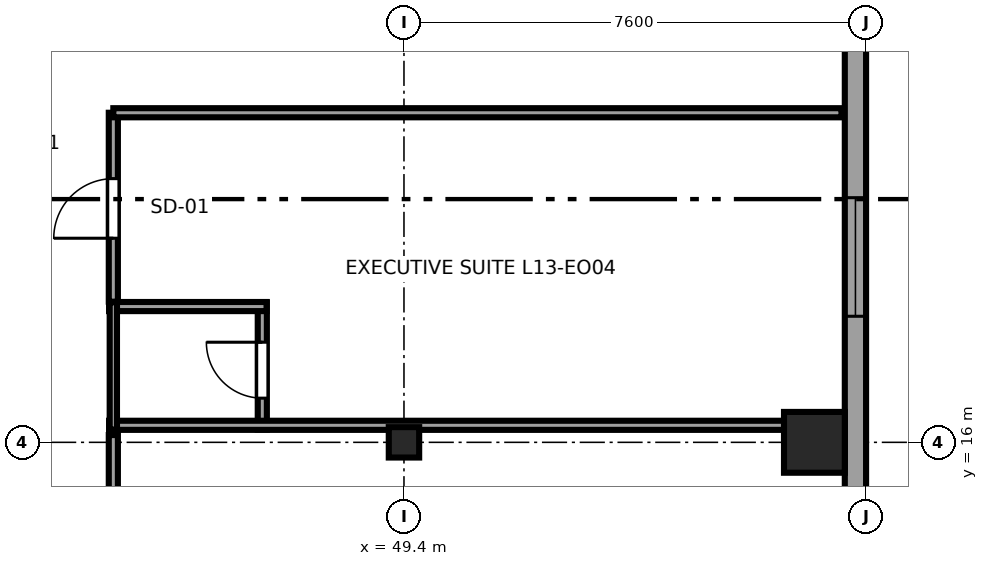
"""IFC4 building model, lengths in metres.
Left out: names, types, materials, properties, quantities, classifications, styles, units other than length and angle.
Written with IfcOpenShell. Run it as: python <this file> out.ifc"""

import sys

from ifc_helpers import new_model, si_unit, direction, frame, frame_2d, origin, origin_2d, place, context, subcontext, project, spatial, rectangle, i_section, extrude, source, transform, mapped, element, fill, save


model = new_model("IFC4")
c1 = context("Model", 3, precision=1e-05, world=origin(), true_north=direction((0.0, 1.0)))
c2 = subcontext(c1, "Body", "Model", "MODEL_VIEW")
j1 = project(units=[si_unit("LENGTHUNIT", "METRE"), si_unit("PLANEANGLEUNIT", "RADIAN")], contexts=[c1])
p1 = place(None, origin())
s1 = spatial("IfcSite", under=j1, at=p1, CompositionType="ELEMENT")
p2 = place(p1, origin())
s2 = spatial("IfcBuilding", under=s1, at=p2, CompositionType="ELEMENT")
p3 = place(p2, frame((0.0, 0.0, 56.85)))
s3 = spatial("IfcBuildingStorey", under=s2, at=p3, CompositionType="ELEMENT", Elevation=56.85)
m1 = source(origin(), c2, "Body", "SweptSolid", [
    extrude(i_section(OverallWidth=0.5, OverallDepth=0.5, WebThickness=0.028, FlangeThickness=0.045, at=origin_2d()), origin(), (0.0, 0.0, 1.0), 3.55),
])
p4 = place(p3, frame((49.4, 16.0, 0.0), z_axis=(0.0, 0.0, 1.0), x_axis=(1.0, 0.0, 0.0)))
e1 = element("IfcColumn", 1, at=p4, inside=s3, PredefinedType="COLUMN", context=c2, shape_type="MappedRepresentation", body=[
    mapped(m1, transform((0.0, 0.0, 0.0), x_axis=(1.0, 0.0, 0.0), y_axis=(0.0, 1.0, 0.0), z_axis=(0.0, 0.0, 1.0), scale=1.0)),
])
m2 = source(origin(), c2, "Body", "SweptSolid", [
    extrude(rectangle(XDim=1.0, YDim=1.0, at=origin_2d()), origin(), (0.0, 0.0, 1.0), 3.55),
])
p5 = place(p3, frame((56.15, 16.0, 0.0), z_axis=(0.0, 0.0, 1.0), x_axis=(1.0, 0.0, 0.0)))
e2 = element("IfcColumn", 2, at=p5, inside=s3, PredefinedType="COLUMN", context=c2, shape_type="MappedRepresentation", body=[
    mapped(m2, transform((0.0, 0.0, 0.0), x_axis=(1.0, 0.0, 0.0), y_axis=(0.0, 1.0, 0.0), z_axis=(0.0, 0.0, 1.0), scale=1.0)),
])
p6 = place(p3, frame((56.825, 4.617, 0.0), z_axis=(0.0, 0.0, 1.0), x_axis=(0.0, 1.0, 0.0)))
e3 = element("IfcWall", 3, at=p6, inside=s3, PredefinedType="SOLIDWALL", context=c2, shape_type="SweptSolid", body=[
    extrude(rectangle(XDim=36.766, YDim=0.35, at=frame_2d((18.383, 0.0))), origin(), (0.0, 0.0, 1.0), 3.37),
])
p7 = place(p6, frame((8.454, 0.0, 0.68)))
e4 = element("IfcOpeningElement", 4, at=p7, cuts=e3, PredefinedType="OPENING", context=c2, shape_type="SweptSolid", body=[
    extrude(rectangle(XDim=1.95, YDim=1.82, at=frame_2d((0.975, 0.91))), frame((0.0, 0.185, 0.0), z_axis=(0.0, -1.0, 0.0), x_axis=(1.0, 0.0, 0.0)), (0.0, 0.0, 1.0), 0.37),
])
p8 = place(p6, frame((13.456, 0.0, 0.68)))
e5 = element("IfcOpeningElement", 5, at=p8, cuts=e3, PredefinedType="OPENING", context=c2, shape_type="SweptSolid", body=[
    extrude(rectangle(XDim=1.95, YDim=1.82, at=frame_2d((0.975, 0.91))), frame((0.0, 0.185, 0.0), z_axis=(0.0, -1.0, 0.0), x_axis=(1.0, 0.0, 0.0)), (0.0, 0.0, 1.0), 0.37),
])
p9 = place(p6, frame((30.313, 0.0, 0.68)))
e6 = element("IfcOpeningElement", 6, at=p9, cuts=e3, PredefinedType="OPENING", context=c2, shape_type="SweptSolid", body=[
    extrude(rectangle(XDim=1.95, YDim=1.82, at=frame_2d((0.975, 0.91))), frame((0.0, 0.185, 0.0), z_axis=(0.0, -1.0, 0.0), x_axis=(1.0, 0.0, 0.0)), (0.0, 0.0, 1.0), 0.37),
])
p10 = place(p6, frame((33.215, 0.0, 0.68)))
e7 = element("IfcOpeningElement", 7, at=p10, cuts=e3, PredefinedType="OPENING", context=c2, shape_type="SweptSolid", body=[
    extrude(rectangle(XDim=1.95, YDim=1.82, at=frame_2d((0.975, 0.91))), frame((0.0, 0.185, 0.0), z_axis=(0.0, -1.0, 0.0), x_axis=(1.0, 0.0, 0.0)), (0.0, 0.0, 1.0), 0.37),
])
p11 = place(p6, frame((4.293, 0.0, 0.62)))
e8 = element("IfcOpeningElement", 8, at=p11, cuts=e3, PredefinedType="OPENING", context=c2, shape_type="SweptSolid", body=[
    extrude(rectangle(XDim=1.5, YDim=1.55, at=frame_2d((0.75, 0.775))), frame((0.0, 0.185, 0.0), z_axis=(0.0, -1.0, 0.0), x_axis=(1.0, 0.0, 0.0)), (0.0, 0.0, 1.0), 0.37),
])
p12 = place(p6, frame((20.493, 0.0, 0.62)))
e9 = element("IfcOpeningElement", 9, at=p12, cuts=e3, PredefinedType="OPENING", context=c2, shape_type="SweptSolid", body=[
    extrude(rectangle(XDim=1.5, YDim=1.55, at=frame_2d((0.75, 0.775))), frame((0.0, 0.185, 0.0), z_axis=(0.0, -1.0, 0.0), x_axis=(1.0, 0.0, 0.0)), (0.0, 0.0, 1.0), 0.37),
])
p13 = place(p3, frame((47.07, 16.21, 0.0), z_axis=(0.0, 0.0, 1.0), x_axis=(0.0, 1.0, 0.0)))
e10 = element("IfcWall", 10, at=p13, inside=s3, PredefinedType="PARTITIONING", context=c2, shape_type="SweptSolid", body=[
    extrude(rectangle(XDim=2.093, YDim=0.15, at=frame_2d((1.046, 0.0))), origin(), (0.0, 0.0, 1.0), 3.37),
])
p14 = place(p13, frame((0.517, 0.0, 0.0)))
e11 = element("IfcOpeningElement", 11, at=p14, cuts=e10, PredefinedType="OPENING", context=c2, shape_type="SweptSolid", body=[
    extrude(rectangle(XDim=0.92, YDim=2.01, at=frame_2d((0.46, 1.005))), frame((0.0, 0.085, 0.0), z_axis=(0.0, -1.0, 0.0), x_axis=(1.0, 0.0, 0.0)), (0.0, 0.0, 1.0), 0.17),
])
p15 = place(p3, frame((44.55, 16.28, 0.0), z_axis=(0.0, 0.0, 1.0), x_axis=(1.0, 0.0, 0.0)))
e12 = element("IfcWall", 12, at=p15, inside=s3, PredefinedType="PARTITIONING", context=c2, shape_type="SweptSolid", body=[
    extrude(rectangle(XDim=12.045, YDim=0.15, at=frame_2d((6.022, 0.0))), origin(), (0.0, 0.0, 1.0), 3.37),
])
p16 = place(p3, frame((44.55, 18.233, 0.0), z_axis=(0.0, 0.0, 1.0), x_axis=(1.0, 0.0, 0.0)))
e13 = element("IfcWall", 13, at=p16, inside=s3, PredefinedType="PARTITIONING", context=c2, shape_type="SweptSolid", body=[
    extrude(rectangle(XDim=2.59, YDim=0.15, at=frame_2d((1.295, 0.0))), origin(), (0.0, 0.0, 1.0), 3.37),
])
p17 = place(p3, frame((44.62, 16.21, 0.0), z_axis=(0.0, 0.0, 1.0), x_axis=(0.0, 1.0, 0.0)))
e14 = element("IfcWall", 14, at=p17, inside=s3, PredefinedType="PLUMBINGWALL", context=c2, shape_type="SweptSolid", body=[
    extrude(rectangle(XDim=2.093, YDim=0.12, at=frame_2d((1.046, 0.0))), origin(), (0.0, 0.0, 1.0), 3.37),
])
p18 = place(p3, frame((44.62, 13.075, 0.0), z_axis=(0.0, 0.0, 1.0), x_axis=(0.0, 1.0, 0.0)))
e15 = element("IfcWall", 15, at=p18, inside=s3, PredefinedType="PARTITIONING", context=c2, shape_type="SweptSolid", body=[
    extrude(rectangle(XDim=3.045, YDim=0.15, at=frame_2d((1.522, 0.0))), origin(), (0.0, 0.0, 1.0), 3.37),
])
p19 = place(p18, frame((1.012, 0.0, 0.0)))
e16 = element("IfcOpeningElement", 16, at=p19, cuts=e15, PredefinedType="OPENING", context=c2, shape_type="SweptSolid", body=[
    extrude(rectangle(XDim=0.98, YDim=2.12, at=frame_2d((0.49, 1.06))), frame((0.0, 0.085, 0.0), z_axis=(0.0, -1.0, 0.0), x_axis=(1.0, 0.0, 0.0)), (0.0, 0.0, 1.0), 0.17),
])
p20 = place(p3, frame((44.62, 18.313, 0.0), z_axis=(0.0, 0.0, 1.0), x_axis=(0.0, 1.0, 0.0)))
e17 = element("IfcWall", 17, at=p20, inside=s3, PredefinedType="PARTITIONING", context=c2, shape_type="SweptSolid", body=[
    extrude(rectangle(XDim=3.107, YDim=0.15, at=frame_2d((1.553, 0.0))), origin(), (0.0, 0.0, 1.0), 3.37),
])
p21 = place(p20, frame((1.043, 0.0, 0.0)))
e18 = element("IfcOpeningElement", 18, at=p21, cuts=e17, PredefinedType="OPENING", context=c2, shape_type="SweptSolid", body=[
    extrude(rectangle(XDim=0.98, YDim=2.12, at=frame_2d((0.49, 1.06))), frame((0.0, 0.085, 0.0), z_axis=(0.0, -1.0, 0.0), x_axis=(1.0, 0.0, 0.0)), (0.0, 0.0, 1.0), 0.17),
])
p22 = place(p3, frame((44.62, 21.42, 0.0), z_axis=(0.0, 0.0, 1.0), x_axis=(1.0, 0.0, 0.0)))
e19 = element("IfcWall", 19, at=p22, inside=s3, PredefinedType="PARTITIONING", context=c2, shape_type="SweptSolid", body=[
    extrude(rectangle(XDim=11.975, YDim=0.15, at=frame_2d((5.987, 0.0))), origin(), (0.0, 0.0, 1.0), 3.37),
])
m3 = source(origin(), c2, "Body", "SweptSolid", [
    extrude(rectangle(XDim=1.95, YDim=1.82, at=frame_2d((0.975, 0.91))), frame((0.0, 0.09, 0.0), z_axis=(0.0, -1.0, 0.0), x_axis=(1.0, 0.0, 0.0)), (0.0, 0.0, 1.0), 0.06),
])
p23 = place(p8, origin())
e20 = element("IfcWindow", 20, at=p23, inside=s3, PartitioningType="DOUBLE_PANEL_VERTICAL", PredefinedType="WINDOW", context=c2, shape_type="MappedRepresentation", body=[
    mapped(m3, transform((0.0, 0.0, 0.0), x_axis=(1.0, 0.0, 0.0), y_axis=(0.0, 1.0, 0.0), z_axis=(0.0, 0.0, 1.0), scale=1.0)),
])
fill(e5, e20)
m4 = source(origin(), c2, "Body", "SweptSolid", [
    extrude(rectangle(XDim=0.92, YDim=2.01, at=frame_2d((0.46, 1.005))), frame((0.0, 0.025, 0.0), z_axis=(0.0, -1.0, 0.0), x_axis=(1.0, 0.0, 0.0)), (0.0, 0.0, 1.0), 0.05),
])
p24 = place(p14, origin())
e21 = element("IfcDoor", 21, at=p24, inside=s3, OperationType="SINGLE_SWING_RIGHT", PredefinedType="DOOR", context=c2, shape_type="MappedRepresentation", body=[
    mapped(m4, transform((0.0, 0.0, 0.0), x_axis=(1.0, 0.0, 0.0), y_axis=(0.0, 1.0, 0.0), z_axis=(0.0, 0.0, 1.0), scale=1.0)),
])
fill(e11, e21)
m5 = source(origin(), c2, "Body", "SweptSolid", [
    extrude(rectangle(XDim=0.98, YDim=2.12, at=frame_2d((0.49, 1.06))), frame((0.0, 0.025, 0.0), z_axis=(0.0, -1.0, 0.0), x_axis=(1.0, 0.0, 0.0)), (0.0, 0.0, 1.0), 0.05),
])
p25 = place(p21, origin())
e22 = element("IfcDoor", 22, at=p25, inside=s3, OperationType="SINGLE_SWING_LEFT", PredefinedType="DOOR", context=c2, shape_type="MappedRepresentation", body=[
    mapped(m5, transform((0.0, 0.0, 0.0), x_axis=(1.0, 0.0, 0.0), y_axis=(0.0, 1.0, 0.0), z_axis=(0.0, 0.0, 1.0), scale=1.0)),
])
fill(e18, e22)
save(model, sys.argv[1])
